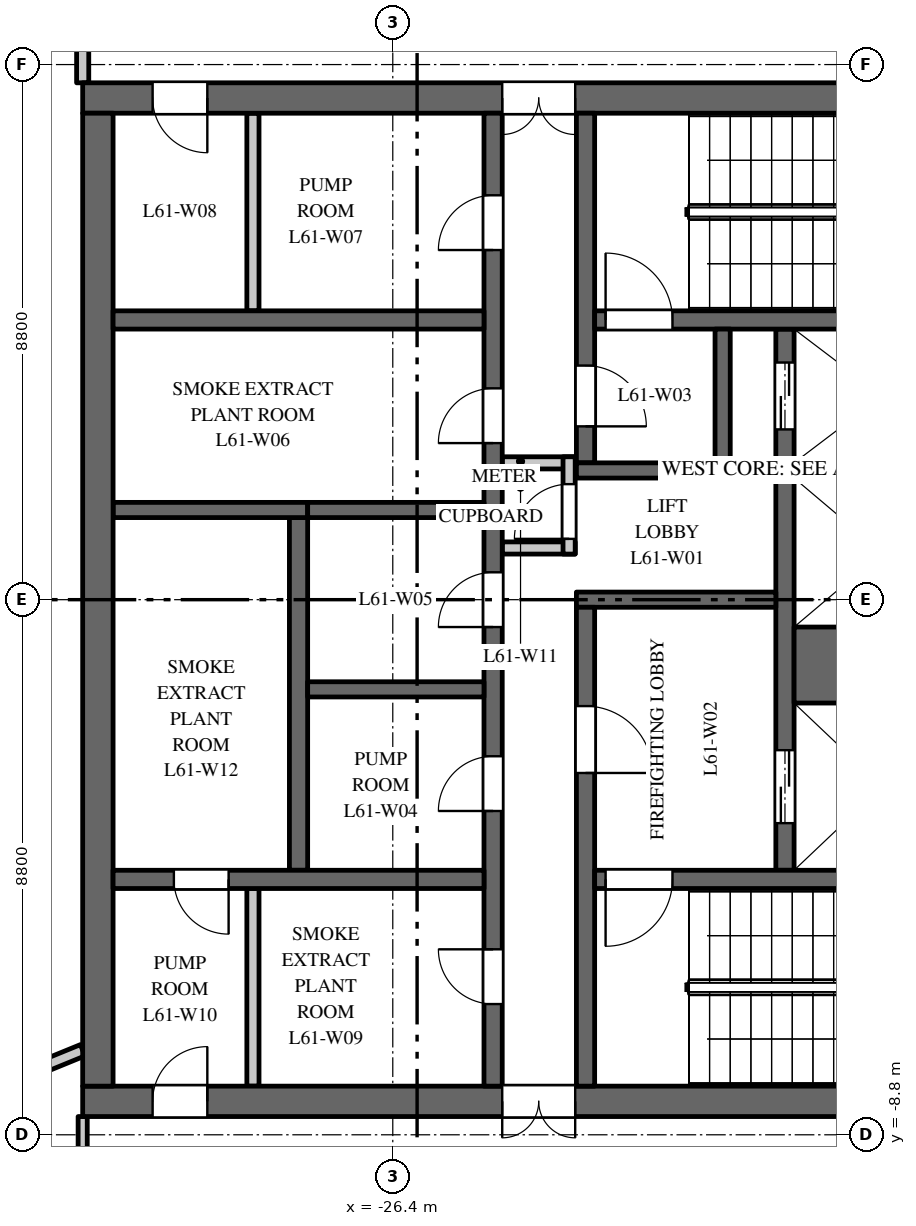
"""IFC4 building model, lengths in metres.
Left out: names, types, materials, properties, quantities, classifications, styles, units other than length and angle.
Written with IfcOpenShell. Run it as: python <this file> out.ifc"""

import sys

from ifc_helpers import new_model, si_unit, direction, frame, frame_2d, origin, place, context, subcontext, project, spatial, rectangle, extrude, element, fill, save


model = new_model("IFC4")
c1 = context("Model", 3, precision=1e-05, world=origin(), true_north=direction((0.0, 1.0)))
c2 = subcontext(c1, "Body", "Model", "MODEL_VIEW")
j1 = project(units=[si_unit("LENGTHUNIT", "METRE"), si_unit("PLANEANGLEUNIT", "RADIAN")], contexts=[c1])
p1 = place(None, origin())
s1 = spatial("IfcSite", under=j1, at=p1, CompositionType="ELEMENT")
p2 = place(p1, origin())
s2 = spatial("IfcBuilding", under=s1, at=p2, CompositionType="ELEMENT")
p3 = place(p2, frame((0.0, 0.0, 285.5)))
s3 = spatial("IfcBuildingStorey", under=s2, at=p3, CompositionType="ELEMENT", Elevation=285.5)
p4 = place(p3, frame((-16.5, 8.25, 0.0), z_axis=(0.0, 0.0, 1.0), x_axis=(-1.0, 0.0, 0.0)))
e1 = element("IfcWall", 1, at=p4, inside=s3, PredefinedType="SHEAR", context=c2, shape_type="SweptSolid", body=[
    extrude(rectangle(XDim=15.0, YDim=0.5, at=frame_2d((7.5, 0.0))), origin(), (0.0, 0.0, 1.0), 5.2),
])
p5 = place(p4, frame((6.9, 0.0, 0.0)))
e2 = element("IfcOpeningElement", 2, at=p5, cuts=e1, PredefinedType="OPENING", context=c2, shape_type="SweptSolid", body=[
    extrude(rectangle(XDim=1.2, YDim=2.1, at=frame_2d((0.6, 1.05))), frame((0.0, 0.26, 0.0), z_axis=(0.0, -1.0, 0.0), x_axis=(1.0, 0.0, 0.0)), (0.0, 0.0, 1.0), 0.52),
])
p6 = place(p4, frame((12.95, 0.0, 0.0)))
e3 = element("IfcOpeningElement", 3, at=p6, cuts=e1, PredefinedType="OPENING", context=c2, shape_type="SweptSolid", body=[
    extrude(rectangle(XDim=0.9, YDim=2.1, at=frame_2d((0.45, 1.05))), frame((0.0, 0.26, 0.0), z_axis=(0.0, -1.0, 0.0), x_axis=(1.0, 0.0, 0.0)), (0.0, 0.0, 1.0), 0.52),
])
p7 = place(p3, frame((-16.5, -8.25, 0.0), z_axis=(0.0, 0.0, 1.0), x_axis=(-1.0, 0.0, 0.0)))
e4 = element("IfcWall", 4, at=p7, inside=s3, PredefinedType="SHEAR", context=c2, shape_type="SweptSolid", body=[
    extrude(rectangle(XDim=15.0, YDim=0.5, at=frame_2d((7.5, 0.0))), origin(), (0.0, 0.0, 1.0), 5.2),
])
p8 = place(p7, frame((6.9, 0.0, 0.0)))
e5 = element("IfcOpeningElement", 5, at=p8, cuts=e4, PredefinedType="OPENING", context=c2, shape_type="SweptSolid", body=[
    extrude(rectangle(XDim=1.2, YDim=2.1, at=frame_2d((0.6, 1.05))), frame((0.0, 0.26, 0.0), z_axis=(0.0, -1.0, 0.0), x_axis=(1.0, 0.0, 0.0)), (0.0, 0.0, 1.0), 0.52),
])
p9 = place(p7, frame((12.95, 0.0, 0.0)))
e6 = element("IfcOpeningElement", 6, at=p9, cuts=e4, PredefinedType="OPENING", context=c2, shape_type="SweptSolid", body=[
    extrude(rectangle(XDim=0.9, YDim=2.1, at=frame_2d((0.45, 1.05))), frame((0.0, 0.26, 0.0), z_axis=(0.0, -1.0, 0.0), x_axis=(1.0, 0.0, 0.0)), (0.0, 0.0, 1.0), 0.52),
])
p10 = place(p3, frame((-27.95, -4.45, 0.0), z_axis=(0.0, 0.0, 1.0), x_axis=(0.0, 1.0, 0.0)))
e7 = element("IfcWall", 7, at=p10, inside=s3, PredefinedType="SHEAR", context=c2, shape_type="SweptSolid", body=[
    extrude(rectangle(XDim=5.8, YDim=0.3, at=frame_2d((2.9, 0.0))), origin(), (0.0, 0.0, 1.0), 5.2),
])
p11 = place(p3, frame((-27.8, 1.475, 0.0), z_axis=(0.0, 0.0, 1.0), x_axis=(-1.0, 0.0, 0.0)))
e8 = element("IfcWall", 8, at=p11, inside=s3, PredefinedType="SHEAR", context=c2, shape_type="SweptSolid", body=[
    extrude(rectangle(XDim=3.2, YDim=0.25, at=frame_2d((1.6, 0.0))), origin(), (0.0, 0.0, 1.0), 5.2),
])
p12 = place(p3, frame((-19.95, -4.45, 0.0), z_axis=(0.0, 0.0, 1.0), x_axis=(0.0, 1.0, 0.0)))
e9 = element("IfcWall", 9, at=p12, inside=s3, PredefinedType="SHEAR", context=c2, shape_type="SweptSolid", body=[
    extrude(rectangle(XDim=8.9, YDim=0.3, at=frame_2d((4.45, 0.0))), origin(), (0.0, 0.0, 1.0), 5.2),
])
p13 = place(p12, frame((0.775, 0.0, 0.0)))
e10 = element("IfcOpeningElement", 10, at=p13, cuts=e9, PredefinedType="OPENING", context=c2, shape_type="SweptSolid", body=[
    extrude(rectangle(XDim=1.2, YDim=2.1, at=frame_2d((0.6, 1.05))), frame((0.0, 0.16, 0.0), z_axis=(0.0, -1.0, 0.0), x_axis=(1.0, 0.0, 0.0)), (0.0, 0.0, 1.0), 0.32),
])
p14 = place(p12, frame((7.25, 0.0, 0.0)))
e11 = element("IfcOpeningElement", 11, at=p14, cuts=e9, PredefinedType="OPENING", context=c2, shape_type="SweptSolid", body=[
    extrude(rectangle(XDim=1.1, YDim=2.1, at=frame_2d((0.55, 1.05))), frame((0.0, 0.16, 0.0), z_axis=(0.0, -1.0, 0.0), x_axis=(1.0, 0.0, 0.0)), (0.0, 0.0, 1.0), 0.32),
])
p15 = place(p3, frame((-24.75, -8.0, 0.0), z_axis=(0.0, 0.0, 1.0), x_axis=(0.0, 1.0, 0.0)))
e12 = element("IfcWall", 12, at=p15, inside=s3, PredefinedType="SHEAR", context=c2, shape_type="SweptSolid", body=[
    extrude(rectangle(XDim=16.0, YDim=0.3, at=frame_2d((8.0, 0.0))), origin(), (0.0, 0.0, 1.0), 5.2),
])
p16 = place(p15, frame((4.525, 0.0, 0.0)))
e13 = element("IfcOpeningElement", 13, at=p16, cuts=e12, PredefinedType="OPENING", context=c2, shape_type="SweptSolid", body=[
    extrude(rectangle(XDim=0.9, YDim=2.1, at=frame_2d((0.45, 1.05))), frame((0.0, 0.16, 0.0), z_axis=(0.0, -1.0, 0.0), x_axis=(1.0, 0.0, 0.0)), (0.0, 0.0, 1.0), 0.32),
])
p17 = place(p15, frame((7.55, 0.0, 0.0)))
e14 = element("IfcOpeningElement", 14, at=p17, cuts=e12, PredefinedType="OPENING", context=c2, shape_type="SweptSolid", body=[
    extrude(rectangle(XDim=0.9, YDim=2.1, at=frame_2d((0.45, 1.05))), frame((0.0, 0.16, 0.0), z_axis=(0.0, -1.0, 0.0), x_axis=(1.0, 0.0, 0.0)), (0.0, 0.0, 1.0), 0.32),
])
p18 = place(p15, frame((10.575, 0.0, 0.0)))
e15 = element("IfcOpeningElement", 15, at=p18, cuts=e12, PredefinedType="OPENING", context=c2, shape_type="SweptSolid", body=[
    extrude(rectangle(XDim=0.9, YDim=2.1, at=frame_2d((0.45, 1.05))), frame((0.0, 0.16, 0.0), z_axis=(0.0, -1.0, 0.0), x_axis=(1.0, 0.0, 0.0)), (0.0, 0.0, 1.0), 0.32),
])
p19 = place(p15, frame((13.75, 0.0, 0.0)))
e16 = element("IfcOpeningElement", 16, at=p19, cuts=e12, PredefinedType="OPENING", context=c2, shape_type="SweptSolid", body=[
    extrude(rectangle(XDim=0.9, YDim=2.1, at=frame_2d((0.45, 1.05))), frame((0.0, 0.16, 0.0), z_axis=(0.0, -1.0, 0.0), x_axis=(1.0, 0.0, 0.0)), (0.0, 0.0, 1.0), 0.32),
])
p20 = place(p15, frame((1.35, 0.0, 0.0)))
e17 = element("IfcOpeningElement", 17, at=p20, cuts=e12, PredefinedType="OPENING", context=c2, shape_type="SweptSolid", body=[
    extrude(rectangle(XDim=0.9, YDim=2.1, at=frame_2d((0.45, 1.05))), frame((0.0, 0.16, 0.0), z_axis=(0.0, -1.0, 0.0), x_axis=(1.0, 0.0, 0.0)), (0.0, 0.0, 1.0), 0.32),
])
p21 = place(p3, frame((-20.1, 0.0, 0.0), z_axis=(0.0, 0.0, 1.0), x_axis=(-1.0, 0.0, 0.0)))
e18 = element("IfcWall", 18, at=p21, inside=s3, PredefinedType="SHEAR", context=c2, shape_type="SweptSolid", body=[
    extrude(rectangle(XDim=3.28, YDim=0.25, at=frame_2d((1.64, 0.0))), origin(), (0.0, 0.0, 1.0), 5.2),
])
for number, where, z_axis, x_axis in (
    (19, (-23.4, 0.85, 0.0), (0.0, 0.0, 1.0), (-1.0, 0.0, 0.0)),
    (20, (-23.4, 2.25, 0.0), (0.0, 0.0, 1.0), (-1.0, 0.0, 0.0)),
):
    element("IfcWall", number, at=place(p3, frame(where, z_axis=z_axis, x_axis=x_axis)), inside=s3, PredefinedType="PARTITIONING", context=c2, shape_type="SweptSolid", body=[
        extrude(rectangle(XDim=1.2, YDim=0.2, at=frame_2d((0.6, 0.0))), origin(), (0.0, 0.0, 1.0), 5.2),
    ])
p22 = place(p3, frame((-23.5, 0.75, 0.0), z_axis=(0.0, 0.0, 1.0), x_axis=(0.0, 1.0, 0.0)))
e21 = element("IfcWall", 21, at=p22, inside=s3, PredefinedType="PARTITIONING", context=c2, shape_type="SweptSolid", body=[
    extrude(rectangle(XDim=1.6, YDim=0.2, at=frame_2d((0.8, 0.0))), origin(), (0.0, 0.0, 1.0), 5.2),
])
p23 = place(p22, frame((0.25, 0.0, 0.0)))
e22 = element("IfcOpeningElement", 22, at=p23, cuts=e21, PredefinedType="OPENING", context=c2, shape_type="SweptSolid", body=[
    extrude(rectangle(XDim=0.9, YDim=2.1, at=frame_2d((0.45, 1.05))), frame((0.0, 0.11, 0.0), z_axis=(0.0, -1.0, 0.0), x_axis=(1.0, 0.0, 0.0)), (0.0, 0.0, 1.0), 0.22),
])
p24 = place(p3, frame((-31.25, -8.0, 0.0), z_axis=(0.0, 0.0, 1.0), x_axis=(0.0, 1.0, 0.0)))
e23 = element("IfcWall", 23, at=p24, inside=s3, PredefinedType="SHEAR", context=c2, shape_type="SweptSolid", body=[
    extrude(rectangle(XDim=16.0, YDim=0.5, at=frame_2d((8.0, 0.0))), origin(), (0.0, 0.0, 1.0), 5.2),
])
p25 = place(p3, frame((-24.9, 4.6, 0.0), z_axis=(0.0, 0.0, 1.0), x_axis=(-1.0, 0.0, 0.0)))
e24 = element("IfcWall", 24, at=p25, inside=s3, PredefinedType="SHEAR", context=c2, shape_type="SweptSolid", body=[
    extrude(rectangle(XDim=6.1, YDim=0.3, at=frame_2d((3.05, 0.0))), origin(), (0.0, 0.0, 1.0), 5.2),
])
for number, where, z_axis, x_axis in (
    (25, (-28.7, 4.75, 0.0), (0.0, 0.0, 1.0), (0.0, 1.0, 0.0)),
    (26, (-28.7, -8.0, 0.0), (0.0, 0.0, 1.0), (0.0, 1.0, 0.0)),
):
    element("IfcWall", number, at=place(p3, frame(where, z_axis=z_axis, x_axis=x_axis)), inside=s3, PredefinedType="PARTITIONING", context=c2, shape_type="SweptSolid", body=[
        extrude(rectangle(XDim=3.25, YDim=0.2, at=frame_2d((1.625, 0.0))), origin(), (0.0, 0.0, 1.0), 5.2),
    ])
p26 = place(p3, frame((-24.9, -4.6, 0.0), z_axis=(0.0, 0.0, 1.0), x_axis=(-1.0, 0.0, 0.0)))
e27 = element("IfcWall", 27, at=p26, inside=s3, PredefinedType="SHEAR", context=c2, shape_type="SweptSolid", body=[
    extrude(rectangle(XDim=6.1, YDim=0.3, at=frame_2d((3.05, 0.0))), origin(), (0.0, 0.0, 1.0), 5.2),
])
p27 = place(p26, frame((4.2, 0.0, 0.0)))
e28 = element("IfcOpeningElement", 28, at=p27, cuts=e27, PredefinedType="OPENING", context=c2, shape_type="SweptSolid", body=[
    extrude(rectangle(XDim=0.9, YDim=2.1, at=frame_2d((0.45, 1.05))), frame((0.0, 0.16, 0.0), z_axis=(0.0, -1.0, 0.0), x_axis=(1.0, 0.0, 0.0)), (0.0, 0.0, 1.0), 0.32),
])
p28 = place(p3, frame((-16.9, -1.075, 0.0), z_axis=(0.0, 0.0, 1.0), x_axis=(-1.0, 0.0, 0.0)))
e29 = element("IfcWall", 29, at=p28, inside=s3, PredefinedType="SHEAR", context=c2, shape_type="SweptSolid", body=[
    extrude(rectangle(XDim=2.9, YDim=1.25, at=frame_2d((1.45, 0.0))), origin(), (0.0, 0.0, 1.0), 5.2),
])
for number, where, z_axis, x_axis in (
    (30, (-16.9, 2.125, 0.0), (0.0, 0.0, 1.0), (-1.0, 0.0, 0.0)),
    (31, (-24.9, -1.475, 0.0), (0.0, 0.0, 1.0), (-1.0, 0.0, 0.0)),
    (32, (-24.9, 1.475, 0.0), (0.0, 0.0, 1.0), (-1.0, 0.0, 0.0)),
):
    element("IfcWall", number, at=place(p3, frame(where, z_axis=z_axis, x_axis=x_axis)), inside=s3, PredefinedType="SHEAR", context=c2, shape_type="SweptSolid", body=[
        extrude(rectangle(XDim=2.9, YDim=0.25, at=frame_2d((1.45, 0.0))), origin(), (0.0, 0.0, 1.0), 5.2),
    ])
p29 = place(p3, frame((-23.23, 2.25, 0.0), z_axis=(0.0, 0.0, 1.0), x_axis=(0.0, 1.0, 0.0)))
e33 = element("IfcWall", 33, at=p29, inside=s3, PredefinedType="SHEAR", context=c2, shape_type="SweptSolid", body=[
    extrude(rectangle(XDim=5.75, YDim=0.3, at=frame_2d((2.875, 0.0))), origin(), (0.0, 0.0, 1.0), 5.2),
])
p30 = place(p29, frame((0.6, 0.0, 0.0)))
e34 = element("IfcOpeningElement", 34, at=p30, cuts=e33, PredefinedType="OPENING", context=c2, shape_type="SweptSolid", body=[
    extrude(rectangle(XDim=1.0, YDim=2.1, at=frame_2d((0.5, 1.05))), frame((0.0, 0.16, 0.0), z_axis=(0.0, -1.0, 0.0), x_axis=(1.0, 0.0, 0.0)), (0.0, 0.0, 1.0), 0.32),
])
p31 = place(p3, frame((-23.23, -8.0, 0.0), z_axis=(0.0, 0.0, 1.0), x_axis=(0.0, 1.0, 0.0)))
e35 = element("IfcWall", 35, at=p31, inside=s3, PredefinedType="SHEAR", context=c2, shape_type="SweptSolid", body=[
    extrude(rectangle(XDim=7.875, YDim=0.3, at=frame_2d((3.938, 0.0))), origin(), (0.0, 0.0, 1.0), 5.2),
])
p32 = place(p31, frame((5.15, 0.0, 0.0)))
e36 = element("IfcOpeningElement", 36, at=p32, cuts=e35, PredefinedType="OPENING", context=c2, shape_type="SweptSolid", body=[
    extrude(rectangle(XDim=1.1, YDim=2.1, at=frame_2d((0.55, 1.05))), frame((0.0, 0.16, 0.0), z_axis=(0.0, -1.0, 0.0), x_axis=(1.0, 0.0, 0.0)), (0.0, 0.0, 1.0), 0.32),
])
p33 = place(p3, frame((-16.9, 4.6, 0.0), z_axis=(0.0, 0.0, 1.0), x_axis=(-1.0, 0.0, 0.0)))
e37 = element("IfcWall", 37, at=p33, inside=s3, PredefinedType="SHEAR", context=c2, shape_type="SweptSolid", body=[
    extrude(rectangle(XDim=6.18, YDim=0.3, at=frame_2d((3.09, 0.0))), origin(), (0.0, 0.0, 1.0), 5.2),
])
p34 = place(p33, frame((4.9, 0.0, 0.0)))
e38 = element("IfcOpeningElement", 38, at=p34, cuts=e37, PredefinedType="OPENING", context=c2, shape_type="SweptSolid", body=[
    extrude(rectangle(XDim=1.1, YDim=2.1, at=frame_2d((0.55, 1.05))), frame((0.0, 0.16, 0.0), z_axis=(0.0, -1.0, 0.0), x_axis=(1.0, 0.0, 0.0)), (0.0, 0.0, 1.0), 0.32),
])
p35 = place(p3, frame((-16.9, -4.6, 0.0), z_axis=(0.0, 0.0, 1.0), x_axis=(-1.0, 0.0, 0.0)))
e39 = element("IfcWall", 39, at=p35, inside=s3, PredefinedType="SHEAR", context=c2, shape_type="SweptSolid", body=[
    extrude(rectangle(XDim=6.18, YDim=0.3, at=frame_2d((3.09, 0.0))), origin(), (0.0, 0.0, 1.0), 5.2),
])
p36 = place(p35, frame((4.9, 0.0, 0.0)))
e40 = element("IfcOpeningElement", 40, at=p36, cuts=e39, PredefinedType="OPENING", context=c2, shape_type="SweptSolid", body=[
    extrude(rectangle(XDim=1.1, YDim=2.1, at=frame_2d((0.55, 1.05))), frame((0.0, 0.16, 0.0), z_axis=(0.0, -1.0, 0.0), x_axis=(1.0, 0.0, 0.0)), (0.0, 0.0, 1.0), 0.32),
])
p37 = place(p3, frame((-20.85, 2.125, 0.0), z_axis=(0.0, 0.0, 1.0), x_axis=(-1.0, 0.0, 0.0)))
e41 = element("IfcWall", 41, at=p37, inside=s3, PredefinedType="SHEAR", context=c2, shape_type="SweptSolid", body=[
    extrude(rectangle(XDim=2.53, YDim=0.25, at=frame_2d((1.265, 0.0))), origin(), (0.0, 0.0, 1.0), 5.2),
])
p38 = place(p3, frame((-20.975, 2.25, 0.0), z_axis=(0.0, 0.0, 1.0), x_axis=(0.0, 1.0, 0.0)))
e42 = element("IfcWall", 42, at=p38, inside=s3, PredefinedType="SHEAR", context=c2, shape_type="SweptSolid", body=[
    extrude(rectangle(XDim=2.2, YDim=0.25, at=frame_2d((1.1, 0.0))), origin(), (0.0, 0.0, 1.0), 5.2),
])
p39 = place(p3, frame((-33.398, -8.187, 0.0), z_axis=(0.0, 0.0, 1.0), x_axis=(0.925433139688, 0.378910944639, 0.0)))
e43 = element("IfcWall", 43, at=p39, inside=s3, PredefinedType="PARTITIONING", context=c2, shape_type="SweptSolid", body=[
    extrude(rectangle(XDim=2.051, YDim=0.2, at=frame_2d((1.025, 0.0))), origin(), (0.0, 0.0, 1.0), 5.2),
])
p40 = place(p3, frame((-31.5, -10.7, 0.0), z_axis=(0.0, 0.0, 1.0), x_axis=(0.0, 1.0, 0.0)))
e44 = element("IfcWall", 44, at=p40, inside=s3, PredefinedType="PARTITIONING", context=c2, shape_type="SweptSolid", body=[
    extrude(rectangle(XDim=2.2, YDim=0.15, at=frame_2d((1.1, 0.0))), origin(), (0.0, 0.0, 1.0), 5.2),
])
p41 = place(p3, frame((-31.5, 8.5, 0.0), z_axis=(0.0, 0.0, 1.0), x_axis=(0.0, 1.0, 0.0)))
e45 = element("IfcWall", 45, at=p41, inside=s3, PredefinedType="PARTITIONING", context=c2, shape_type="SweptSolid", body=[
    extrude(rectangle(XDim=2.2, YDim=0.2, at=frame_2d((1.1, 0.0))), origin(), (0.0, 0.0, 1.0), 5.2),
])
p42 = place(p13, origin())
e46 = element("IfcDoor", 46, at=p42, inside=s3, OperationType="DOUBLE_DOOR_SLIDING", PredefinedType="DOOR", context=c2, shape_type="SweptSolid", body=[
    extrude(rectangle(XDim=1.2, YDim=2.1, at=frame_2d((0.6, 1.05))), frame((0.0, 0.025, 0.0), z_axis=(0.0, -1.0, 0.0), x_axis=(1.0, 0.0, 0.0)), (0.0, 0.0, 1.0), 0.05),
])
fill(e10, e46)
p43 = place(p14, origin())
e47 = element("IfcDoor", 47, at=p43, inside=s3, OperationType="DOUBLE_DOOR_SLIDING", PredefinedType="DOOR", context=c2, shape_type="SweptSolid", body=[
    extrude(rectangle(XDim=1.1, YDim=2.1, at=frame_2d((0.55, 1.05))), frame((0.0, 0.025, 0.0), z_axis=(0.0, -1.0, 0.0), x_axis=(1.0, 0.0, 0.0)), (0.0, 0.0, 1.0), 0.05),
])
fill(e11, e47)
p44 = place(p34, origin())
e48 = element("IfcDoor", 48, at=p44, inside=s3, OperationType="SINGLE_SWING_RIGHT", PredefinedType="DOOR", context=c2, shape_type="SweptSolid", body=[
    extrude(rectangle(XDim=1.1, YDim=2.1, at=frame_2d((0.55, 1.05))), frame((0.0, 0.025, 0.0), z_axis=(0.0, -1.0, 0.0), x_axis=(1.0, 0.0, 0.0)), (0.0, 0.0, 1.0), 0.05),
])
fill(e38, e48)
p45 = place(p36, origin())
e49 = element("IfcDoor", 49, at=p45, inside=s3, OperationType="SINGLE_SWING_LEFT", PredefinedType="DOOR", context=c2, shape_type="SweptSolid", body=[
    extrude(rectangle(XDim=1.1, YDim=2.1, at=frame_2d((0.55, 1.05))), frame((0.0, 0.025, 0.0), z_axis=(0.0, -1.0, 0.0), x_axis=(1.0, 0.0, 0.0)), (0.0, 0.0, 1.0), 0.05),
])
fill(e40, e49)
p46 = place(p32, origin())
e50 = element("IfcDoor", 50, at=p46, inside=s3, OperationType="SINGLE_SWING_LEFT", PredefinedType="DOOR", context=c2, shape_type="SweptSolid", body=[
    extrude(rectangle(XDim=1.1, YDim=2.1, at=frame_2d((0.55, 1.05))), frame((0.0, 0.025, 0.0), z_axis=(0.0, -1.0, 0.0), x_axis=(1.0, 0.0, 0.0)), (0.0, 0.0, 1.0), 0.05),
])
fill(e36, e50)
p47 = place(p30, origin())
e51 = element("IfcDoor", 51, at=p47, inside=s3, OperationType="SINGLE_SWING_LEFT", PredefinedType="DOOR", context=c2, shape_type="SweptSolid", body=[
    extrude(rectangle(XDim=1.0, YDim=2.1, at=frame_2d((0.5, 1.05))), frame((0.0, 0.025, 0.0), z_axis=(0.0, -1.0, 0.0), x_axis=(1.0, 0.0, 0.0)), (0.0, 0.0, 1.0), 0.05),
])
fill(e34, e51)
p48 = place(p5, origin())
e52 = element("IfcDoor", 52, at=p48, inside=s3, OperationType="DOUBLE_DOOR_DOUBLE_SWING", PredefinedType="DOOR", context=c2, shape_type="SweptSolid", body=[
    extrude(rectangle(XDim=1.2, YDim=2.1, at=frame_2d((0.6, 1.05))), frame((0.0, 0.025, 0.0), z_axis=(0.0, -1.0, 0.0), x_axis=(1.0, 0.0, 0.0)), (0.0, 0.0, 1.0), 0.05),
])
fill(e2, e52)
p49 = place(p8, origin())
e53 = element("IfcDoor", 53, at=p49, inside=s3, OperationType="DOUBLE_DOOR_DOUBLE_SWING", PredefinedType="DOOR", context=c2, shape_type="SweptSolid", body=[
    extrude(rectangle(XDim=1.2, YDim=2.1, at=frame_2d((0.6, 1.05))), frame((0.0, 0.025, 0.0), z_axis=(0.0, -1.0, 0.0), x_axis=(1.0, 0.0, 0.0)), (0.0, 0.0, 1.0), 0.05),
])
fill(e5, e53)
p50 = place(p16, origin())
e54 = element("IfcDoor", 54, at=p50, inside=s3, OperationType="SINGLE_SWING_RIGHT", PredefinedType="DOOR", context=c2, shape_type="SweptSolid", body=[
    extrude(rectangle(XDim=0.9, YDim=2.1, at=frame_2d((0.45, 1.05))), frame((0.0, 0.025, 0.0), z_axis=(0.0, -1.0, 0.0), x_axis=(1.0, 0.0, 0.0)), (0.0, 0.0, 1.0), 0.05),
])
fill(e13, e54)
p51 = place(p17, origin())
e55 = element("IfcDoor", 55, at=p51, inside=s3, OperationType="SINGLE_SWING_RIGHT", PredefinedType="DOOR", context=c2, shape_type="SweptSolid", body=[
    extrude(rectangle(XDim=0.9, YDim=2.1, at=frame_2d((0.45, 1.05))), frame((0.0, 0.025, 0.0), z_axis=(0.0, -1.0, 0.0), x_axis=(1.0, 0.0, 0.0)), (0.0, 0.0, 1.0), 0.05),
])
fill(e14, e55)
p52 = place(p18, origin())
e56 = element("IfcDoor", 56, at=p52, inside=s3, OperationType="SINGLE_SWING_RIGHT", PredefinedType="DOOR", context=c2, shape_type="SweptSolid", body=[
    extrude(rectangle(XDim=0.9, YDim=2.1, at=frame_2d((0.45, 1.05))), frame((0.0, 0.025, 0.0), z_axis=(0.0, -1.0, 0.0), x_axis=(1.0, 0.0, 0.0)), (0.0, 0.0, 1.0), 0.05),
])
fill(e15, e56)
p53 = place(p19, origin())
e57 = element("IfcDoor", 57, at=p53, inside=s3, OperationType="SINGLE_SWING_RIGHT", PredefinedType="DOOR", context=c2, shape_type="SweptSolid", body=[
    extrude(rectangle(XDim=0.9, YDim=2.1, at=frame_2d((0.45, 1.05))), frame((0.0, 0.025, 0.0), z_axis=(0.0, -1.0, 0.0), x_axis=(1.0, 0.0, 0.0)), (0.0, 0.0, 1.0), 0.05),
])
fill(e16, e57)
p54 = place(p6, origin())
e58 = element("IfcDoor", 58, at=p54, inside=s3, OperationType="SINGLE_SWING_RIGHT", PredefinedType="DOOR", context=c2, shape_type="SweptSolid", body=[
    extrude(rectangle(XDim=0.9, YDim=2.1, at=frame_2d((0.45, 1.05))), frame((0.0, 0.025, 0.0), z_axis=(0.0, -1.0, 0.0), x_axis=(1.0, 0.0, 0.0)), (0.0, 0.0, 1.0), 0.05),
])
fill(e3, e58)
p55 = place(p20, origin())
e59 = element("IfcDoor", 59, at=p55, inside=s3, OperationType="SINGLE_SWING_LEFT", PredefinedType="DOOR", context=c2, shape_type="SweptSolid", body=[
    extrude(rectangle(XDim=0.9, YDim=2.1, at=frame_2d((0.45, 1.05))), frame((0.0, 0.025, 0.0), z_axis=(0.0, -1.0, 0.0), x_axis=(1.0, 0.0, 0.0)), (0.0, 0.0, 1.0), 0.05),
])
fill(e17, e59)
p56 = place(p9, origin())
e60 = element("IfcDoor", 60, at=p56, inside=s3, OperationType="SINGLE_SWING_LEFT", PredefinedType="DOOR", context=c2, shape_type="SweptSolid", body=[
    extrude(rectangle(XDim=0.9, YDim=2.1, at=frame_2d((0.45, 1.05))), frame((0.0, 0.025, 0.0), z_axis=(0.0, -1.0, 0.0), x_axis=(1.0, 0.0, 0.0)), (0.0, 0.0, 1.0), 0.05),
])
fill(e6, e60)
p57 = place(p23, origin())
e61 = element("IfcDoor", 61, at=p57, inside=s3, OperationType="SINGLE_SWING_RIGHT", PredefinedType="DOOR", context=c2, shape_type="SweptSolid", body=[
    extrude(rectangle(XDim=0.9, YDim=2.1, at=frame_2d((0.45, 1.05))), frame((0.0, 0.025, 0.0), z_axis=(0.0, -1.0, 0.0), x_axis=(1.0, 0.0, 0.0)), (0.0, 0.0, 1.0), 0.05),
])
fill(e22, e61)
p58 = place(p27, origin())
e62 = element("IfcDoor", 62, at=p58, inside=s3, OperationType="SINGLE_SWING_RIGHT", PredefinedType="DOOR", context=c2, shape_type="SweptSolid", body=[
    extrude(rectangle(XDim=0.9, YDim=2.1, at=frame_2d((0.45, 1.05))), frame((0.0, 0.025, 0.0), z_axis=(0.0, -1.0, 0.0), x_axis=(1.0, 0.0, 0.0)), (0.0, 0.0, 1.0), 0.05),
])
fill(e28, e62)
save(model, sys.argv[1])
